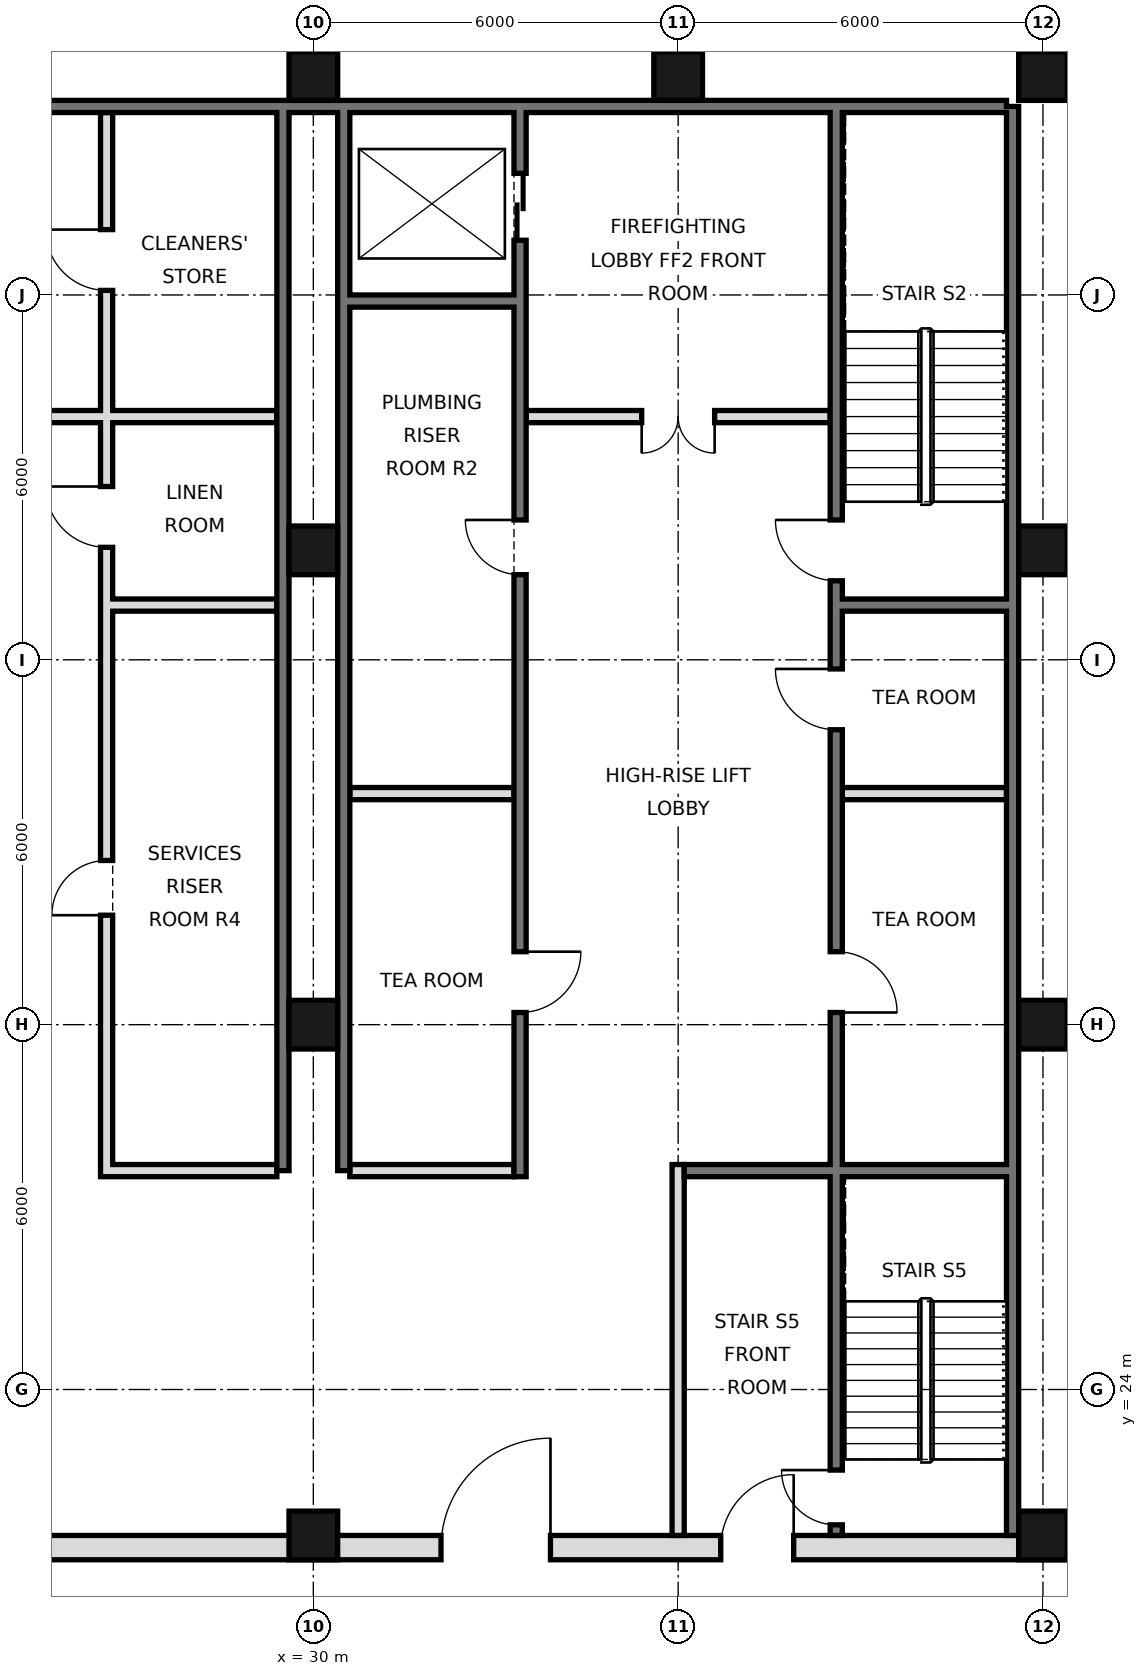
"""IFC4 building model, lengths in metres.
Left out: names, types, materials, properties, quantities, classifications, styles, units other than length and angle.
Written with IfcOpenShell. Run it as: python <this file> out.ifc"""

import sys

from ifc_helpers import new_model, si_unit, direction, frame, frame_2d, origin, origin_2d, place, context, subcontext, project, spatial, rectangle, hollow_rectangle, extrude, element, fill, save


model = new_model("IFC4")
c1 = context("Model", 3, precision=1e-05, world=origin(), true_north=direction((0.0, 1.0)))
c2 = subcontext(c1, "Body", "Model", "MODEL_VIEW")
j1 = project(units=[si_unit("LENGTHUNIT", "METRE"), si_unit("PLANEANGLEUNIT", "RADIAN")], contexts=[c1])
p1 = place(None, origin())
s1 = spatial("IfcSite", under=j1, at=p1, CompositionType="ELEMENT")
p2 = place(p1, origin())
s2 = spatial("IfcBuilding", under=s1, at=p2, CompositionType="ELEMENT")
p3 = place(p2, frame((0.0, 0.0, 82.2)))
s3 = spatial("IfcBuildingStorey", under=s2, at=p3, CompositionType="ELEMENT", Elevation=82.2)
for number, where, z_axis, x_axis in (
    (1, (30.0, 21.6, 0.0), (0.0, 0.0, 1.0), (1.0, 0.0, 0.0)),
    (2, (30.0, 30.0, 0.0), (0.0, 0.0, 1.0), (1.0, 0.0, 0.0)),
    (3, (30.0, 37.8, 0.0), (0.0, 0.0, 1.0), (1.0, 0.0, 0.0)),
    (4, (30.0, 45.6, 0.0), (0.0, 0.0, 1.0), (1.0, 0.0, 0.0)),
    (5, (36.0, 45.6, 0.0), (0.0, 0.0, 1.0), (1.0, 0.0, 0.0)),
    (6, (42.0, 21.6, 0.0), (0.0, 0.0, 1.0), (1.0, 0.0, 0.0)),
    (7, (42.0, 30.0, 0.0), (0.0, 0.0, 1.0), (1.0, 0.0, 0.0)),
    (8, (42.0, 37.8, 0.0), (0.0, 0.0, 1.0), (1.0, 0.0, 0.0)),
    (9, (42.0, 45.6, 0.0), (0.0, 0.0, 1.0), (1.0, 0.0, 0.0)),
):
    element("IfcColumn", number, at=place(p3, frame(where, z_axis=z_axis, x_axis=x_axis)), inside=s3, PredefinedType="COLUMN", context=c2, shape_type="SweptSolid", body=[
        extrude(hollow_rectangle(XDim=0.8, YDim=0.8, WallThickness=0.06, at=origin_2d()), origin(), (0.0, 0.0, 1.0), 3.6),
    ])
p4 = place(p3, frame((41.5, 21.6, 0.0), z_axis=(0.0, 0.0, 1.0), x_axis=(0.0, 1.0, 0.0)))
e10 = element("IfcWall", 10, at=p4, inside=s3, PredefinedType="SOLIDWALL", context=c2, shape_type="SweptSolid", body=[
    extrude(rectangle(XDim=23.5, YDim=0.2, at=frame_2d((11.75, 0.0))), origin(), (0.0, 0.0, 1.0), 3.42),
])
p5 = place(p3, frame((6.6, 45.1, 0.0), z_axis=(0.0, 0.0, 1.0), x_axis=(1.0, 0.0, 0.0)))
e11 = element("IfcWall", 11, at=p5, inside=s3, PredefinedType="SOLIDWALL", context=c2, shape_type="SweptSolid", body=[
    extrude(rectangle(XDim=34.8, YDim=0.2, at=frame_2d((17.4, 0.0))), origin(), (0.0, 0.0, 1.0), 3.42),
])
for number, where, z_axis, x_axis in (
    (12, (29.5, 27.6, 0.0), (0.0, 0.0, 1.0), (0.0, 1.0, 0.0)),
    (13, (30.5, 27.6, 0.0), (0.0, 0.0, 1.0), (0.0, 1.0, 0.0)),
):
    element("IfcWall", number, at=place(p3, frame(where, z_axis=z_axis, x_axis=x_axis)), inside=s3, PredefinedType="SOLIDWALL", context=c2, shape_type="SweptSolid", body=[
        extrude(rectangle(XDim=17.5, YDim=0.2, at=frame_2d((8.75, 0.0))), origin(), (0.0, 0.0, 1.0), 3.42),
    ])
p6 = place(p3, frame((5.6, 21.4, 0.0), z_axis=(0.0, 0.0, 1.0), x_axis=(1.0, 0.0, 0.0)))
e14 = element("IfcWall", 14, at=p6, inside=s3, PredefinedType="SOLIDWALL", context=c2, shape_type="SweptSolid", body=[
    extrude(rectangle(XDim=36.8, YDim=0.4, at=frame_2d((18.4, 0.0))), origin(), (0.0, 0.0, 1.0), 3.42),
])
p7 = place(p6, frame((8.5, 0.0, 0.0)))
e15 = element("IfcOpeningElement", 15, at=p7, cuts=e14, PredefinedType="OPENING", context=c2, shape_type="SweptSolid", body=[
    extrude(rectangle(XDim=1.8, YDim=2.1, at=frame_2d((0.9, 1.05))), frame((0.0, 0.21, 0.0), z_axis=(0.0, -1.0, 0.0), x_axis=(1.0, 0.0, 0.0)), (0.0, 0.0, 1.0), 0.42),
])
p8 = place(p6, frame((17.5, 0.0, 0.0)))
e16 = element("IfcOpeningElement", 16, at=p8, cuts=e14, PredefinedType="OPENING", context=c2, shape_type="SweptSolid", body=[
    extrude(rectangle(XDim=1.8, YDim=2.1, at=frame_2d((0.9, 1.05))), frame((0.0, 0.21, 0.0), z_axis=(0.0, -1.0, 0.0), x_axis=(1.0, 0.0, 0.0)), (0.0, 0.0, 1.0), 0.42),
])
p9 = place(p6, frame((26.5, 0.0, 0.0)))
e17 = element("IfcOpeningElement", 17, at=p9, cuts=e14, PredefinedType="OPENING", context=c2, shape_type="SweptSolid", body=[
    extrude(rectangle(XDim=1.8, YDim=2.1, at=frame_2d((0.9, 1.05))), frame((0.0, 0.21, 0.0), z_axis=(0.0, -1.0, 0.0), x_axis=(1.0, 0.0, 0.0)), (0.0, 0.0, 1.0), 0.42),
])
p10 = place(p6, frame((4.5, 0.0, 0.0)))
e18 = element("IfcOpeningElement", 18, at=p10, cuts=e14, PredefinedType="OPENING", context=c2, shape_type="SweptSolid", body=[
    extrude(rectangle(XDim=1.2, YDim=2.1, at=frame_2d((0.6, 1.05))), frame((0.0, 0.21, 0.0), z_axis=(0.0, -1.0, 0.0), x_axis=(1.0, 0.0, 0.0)), (0.0, 0.0, 1.0), 0.42),
])
p11 = place(p6, frame((31.1, 0.0, 0.0)))
e19 = element("IfcOpeningElement", 19, at=p11, cuts=e14, PredefinedType="OPENING", context=c2, shape_type="SweptSolid", body=[
    extrude(rectangle(XDim=1.2, YDim=2.1, at=frame_2d((0.6, 1.05))), frame((0.0, 0.21, 0.0), z_axis=(0.0, -1.0, 0.0), x_axis=(1.0, 0.0, 0.0)), (0.0, 0.0, 1.0), 0.42),
])
p12 = place(p3, frame((26.6, 27.5, 0.0), z_axis=(0.0, 0.0, 1.0), x_axis=(0.0, 1.0, 0.0)))
e20 = element("IfcWall", 20, at=p12, inside=s3, PredefinedType="SOLIDWALL", context=c2, shape_type="SweptSolid", body=[
    extrude(rectangle(XDim=17.5, YDim=0.2, at=frame_2d((8.75, 0.0))), origin(), (0.0, 0.0, 1.0), 3.42),
])
p13 = place(p12, frame((4.3, 0.0, 0.0)))
e21 = element("IfcOpeningElement", 21, at=p13, cuts=e20, PredefinedType="OPENING", context=c2, shape_type="SweptSolid", body=[
    extrude(rectangle(XDim=0.9, YDim=2.1, at=frame_2d((0.45, 1.05))), frame((0.0, 0.11, 0.0), z_axis=(0.0, -1.0, 0.0), x_axis=(1.0, 0.0, 0.0)), (0.0, 0.0, 1.0), 0.22),
])
p14 = place(p12, frame((10.35, 0.0, 0.0)))
e22 = element("IfcOpeningElement", 22, at=p14, cuts=e20, PredefinedType="OPENING", context=c2, shape_type="SweptSolid", body=[
    extrude(rectangle(XDim=1.0, YDim=2.1, at=frame_2d((0.5, 1.05))), frame((0.0, 0.11, 0.0), z_axis=(0.0, -1.0, 0.0), x_axis=(1.0, 0.0, 0.0)), (0.0, 0.0, 1.0), 0.22),
])
p15 = place(p12, frame((14.575, 0.0, 0.0)))
e23 = element("IfcOpeningElement", 23, at=p15, cuts=e20, PredefinedType="OPENING", context=c2, shape_type="SweptSolid", body=[
    extrude(rectangle(XDim=1.0, YDim=2.1, at=frame_2d((0.5, 1.05))), frame((0.0, 0.11, 0.0), z_axis=(0.0, -1.0, 0.0), x_axis=(1.0, 0.0, 0.0)), (0.0, 0.0, 1.0), 0.22),
])
p16 = place(p3, frame((33.4, 27.5, 0.0), z_axis=(0.0, 0.0, 1.0), x_axis=(0.0, 1.0, 0.0)))
e24 = element("IfcWall", 24, at=p16, inside=s3, PredefinedType="SOLIDWALL", context=c2, shape_type="SweptSolid", body=[
    extrude(rectangle(XDim=17.5, YDim=0.2, at=frame_2d((8.75, 0.0))), origin(), (0.0, 0.0, 1.0), 3.42),
])
p17 = place(p16, frame((15.4, 0.0, 0.0)))
e25 = element("IfcOpeningElement", 25, at=p17, cuts=e24, PredefinedType="OPENING", context=c2, shape_type="SweptSolid", body=[
    extrude(rectangle(XDim=1.1, YDim=2.1, at=frame_2d((0.55, 1.05))), frame((0.0, 0.11, 0.0), z_axis=(0.0, -1.0, 0.0), x_axis=(1.0, 0.0, 0.0)), (0.0, 0.0, 1.0), 0.22),
])
p18 = place(p16, frame((2.7, 0.0, 0.0)))
e26 = element("IfcOpeningElement", 26, at=p18, cuts=e24, PredefinedType="OPENING", context=c2, shape_type="SweptSolid", body=[
    extrude(rectangle(XDim=1.0, YDim=2.1, at=frame_2d((0.5, 1.05))), frame((0.0, 0.11, 0.0), z_axis=(0.0, -1.0, 0.0), x_axis=(1.0, 0.0, 0.0)), (0.0, 0.0, 1.0), 0.22),
])
p19 = place(p16, frame((9.9, 0.0, 0.0)))
e27 = element("IfcOpeningElement", 27, at=p19, cuts=e24, PredefinedType="OPENING", context=c2, shape_type="SweptSolid", body=[
    extrude(rectangle(XDim=0.9, YDim=2.1, at=frame_2d((0.45, 1.05))), frame((0.0, 0.11, 0.0), z_axis=(0.0, -1.0, 0.0), x_axis=(1.0, 0.0, 0.0)), (0.0, 0.0, 1.0), 0.22),
])
p20 = place(p3, frame((36.0, 21.6, 0.0), z_axis=(0.0, 0.0, 1.0), x_axis=(0.0, 1.0, 0.0)))
e28 = element("IfcWall", 28, at=p20, inside=s3, PredefinedType="PARTITIONING", context=c2, shape_type="SweptSolid", body=[
    extrude(rectangle(XDim=6.1, YDim=0.2, at=frame_2d((3.05, 0.0))), origin(), (0.0, 0.0, 1.0), 3.42),
])
p21 = place(p3, frame((38.6, 21.6, 0.0), z_axis=(0.0, 0.0, 1.0), x_axis=(0.0, 1.0, 0.0)))
e29 = element("IfcWall", 29, at=p21, inside=s3, PredefinedType="SOLIDWALL", context=c2, shape_type="SweptSolid", body=[
    extrude(rectangle(XDim=23.4, YDim=0.2, at=frame_2d((11.7, 0.0))), origin(), (0.0, 0.0, 1.0), 3.42),
])
p22 = place(p21, frame((8.6, 0.0, 0.0)))
e30 = element("IfcOpeningElement", 30, at=p22, cuts=e29, PredefinedType="OPENING", context=c2, shape_type="SweptSolid", body=[
    extrude(rectangle(XDim=1.0, YDim=2.1, at=frame_2d((0.5, 1.05))), frame((0.0, 0.11, 0.0), z_axis=(0.0, -1.0, 0.0), x_axis=(1.0, 0.0, 0.0)), (0.0, 0.0, 1.0), 0.22),
])
p23 = place(p21, frame((13.25, 0.0, 0.0)))
e31 = element("IfcOpeningElement", 31, at=p23, cuts=e29, PredefinedType="OPENING", context=c2, shape_type="SweptSolid", body=[
    extrude(rectangle(XDim=1.0, YDim=2.1, at=frame_2d((0.5, 1.05))), frame((0.0, 0.11, 0.0), z_axis=(0.0, -1.0, 0.0), x_axis=(1.0, 0.0, 0.0)), (0.0, 0.0, 1.0), 0.22),
])
p24 = place(p21, frame((15.7, 0.0, 0.0)))
e32 = element("IfcOpeningElement", 32, at=p24, cuts=e29, PredefinedType="OPENING", context=c2, shape_type="SweptSolid", body=[
    extrude(rectangle(XDim=1.0, YDim=2.1, at=frame_2d((0.5, 1.05))), frame((0.0, 0.11, 0.0), z_axis=(0.0, -1.0, 0.0), x_axis=(1.0, 0.0, 0.0)), (0.0, 0.0, 1.0), 0.22),
])
p25 = place(p21, frame((0.175, 0.0, 0.0)))
e33 = element("IfcOpeningElement", 33, at=p25, cuts=e29, PredefinedType="OPENING", context=c2, shape_type="SweptSolid", body=[
    extrude(rectangle(XDim=0.9, YDim=2.1, at=frame_2d((0.45, 1.05))), frame((0.0, 0.11, 0.0), z_axis=(0.0, -1.0, 0.0), x_axis=(1.0, 0.0, 0.0)), (0.0, 0.0, 1.0), 0.22),
])
p26 = place(p3, frame((26.7, 27.6, 0.0), z_axis=(0.0, 0.0, 1.0), x_axis=(1.0, 0.0, 0.0)))
e34 = element("IfcWall", 34, at=p26, inside=s3, PredefinedType="SOLIDWALL", context=c2, shape_type="SweptSolid", body=[
    extrude(rectangle(XDim=2.7, YDim=0.2, at=frame_2d((1.35, 0.0))), origin(), (0.0, 0.0, 1.0), 3.42),
])
p27 = place(p3, frame((30.6, 27.6, 0.0), z_axis=(0.0, 0.0, 1.0), x_axis=(1.0, 0.0, 0.0)))
e35 = element("IfcWall", 35, at=p27, inside=s3, PredefinedType="PARTITIONING", context=c2, shape_type="SweptSolid", body=[
    extrude(rectangle(XDim=2.7, YDim=0.2, at=frame_2d((1.35, 0.0))), origin(), (0.0, 0.0, 1.0), 3.42),
])
p28 = place(p3, frame((36.1, 27.6, 0.0), z_axis=(0.0, 0.0, 1.0), x_axis=(1.0, 0.0, 0.0)))
e36 = element("IfcWall", 36, at=p28, inside=s3, PredefinedType="SOLIDWALL", context=c2, shape_type="SweptSolid", body=[
    extrude(rectangle(XDim=5.3, YDim=0.2, at=frame_2d((2.65, 0.0))), origin(), (0.0, 0.0, 1.0), 3.42),
])
p29 = place(p3, frame((30.6, 33.8, 0.0), z_axis=(0.0, 0.0, 1.0), x_axis=(1.0, 0.0, 0.0)))
e37 = element("IfcWall", 37, at=p29, inside=s3, PredefinedType="SOLIDWALL", context=c2, shape_type="SweptSolid", body=[
    extrude(rectangle(XDim=2.7, YDim=0.2, at=frame_2d((1.35, 0.0))), origin(), (0.0, 0.0, 1.0), 3.42),
])
p30 = place(p3, frame((38.7, 33.8, 0.0), z_axis=(0.0, 0.0, 1.0), x_axis=(1.0, 0.0, 0.0)))
e38 = element("IfcWall", 38, at=p30, inside=s3, PredefinedType="PARTITIONING", context=c2, shape_type="SweptSolid", body=[
    extrude(rectangle(XDim=2.7, YDim=0.2, at=frame_2d((1.35, 0.0))), origin(), (0.0, 0.0, 1.0), 3.42),
])
for number, where, z_axis, x_axis in (
    (39, (26.7, 36.9, 0.0), (0.0, 0.0, 1.0), (1.0, 0.0, 0.0)),
    (40, (38.7, 36.9, 0.0), (0.0, 0.0, 1.0), (1.0, 0.0, 0.0)),
):
    element("IfcWall", number, at=place(p3, frame(where, z_axis=z_axis, x_axis=x_axis)), inside=s3, PredefinedType="SOLIDWALL", context=c2, shape_type="SweptSolid", body=[
        extrude(rectangle(XDim=2.7, YDim=0.2, at=frame_2d((1.35, 0.0))), origin(), (0.0, 0.0, 1.0), 3.42),
    ])
p31 = place(p3, frame((21.5, 40.0, 0.0), z_axis=(0.0, 0.0, 1.0), x_axis=(1.0, 0.0, 0.0)))
e41 = element("IfcWall", 41, at=p31, inside=s3, PredefinedType="PARTITIONING", context=c2, shape_type="SweptSolid", body=[
    extrude(rectangle(XDim=7.9, YDim=0.2, at=frame_2d((3.95, 0.0))), origin(), (0.0, 0.0, 1.0), 3.42),
])
p32 = place(p31, frame((1.9, 0.0, 0.0)))
e42 = element("IfcOpeningElement", 42, at=p32, cuts=e41, PredefinedType="OPENING", context=c2, shape_type="SweptSolid", body=[
    extrude(rectangle(XDim=1.2, YDim=2.1, at=frame_2d((0.6, 1.05))), frame((0.0, 0.11, 0.0), z_axis=(0.0, -1.0, 0.0), x_axis=(1.0, 0.0, 0.0)), (0.0, 0.0, 1.0), 0.22),
])
p33 = place(p3, frame((33.5, 40.0, 0.0), z_axis=(0.0, 0.0, 1.0), x_axis=(1.0, 0.0, 0.0)))
e43 = element("IfcWall", 43, at=p33, inside=s3, PredefinedType="PARTITIONING", context=c2, shape_type="SweptSolid", body=[
    extrude(rectangle(XDim=5.0, YDim=0.2, at=frame_2d((2.5, 0.0))), origin(), (0.0, 0.0, 1.0), 3.42),
])
p34 = place(p33, frame((1.9, 0.0, 0.0)))
e44 = element("IfcOpeningElement", 44, at=p34, cuts=e43, PredefinedType="OPENING", context=c2, shape_type="SweptSolid", body=[
    extrude(rectangle(XDim=1.2, YDim=2.1, at=frame_2d((0.6, 1.05))), frame((0.0, 0.11, 0.0), z_axis=(0.0, -1.0, 0.0), x_axis=(1.0, 0.0, 0.0)), (0.0, 0.0, 1.0), 0.22),
])
p35 = place(p3, frame((30.6, 41.9, 0.0), z_axis=(0.0, 0.0, 1.0), x_axis=(1.0, 0.0, 0.0)))
e45 = element("IfcWall", 45, at=p35, inside=s3, PredefinedType="SOLIDWALL", context=c2, shape_type="SweptSolid", body=[
    extrude(rectangle(XDim=2.7, YDim=0.2, at=frame_2d((1.35, 0.0))), origin(), (0.0, 0.0, 1.0), 3.42),
])
p36 = place(p9, frame((1.8, 0.0, 0.0), z_axis=(0.0, 0.0, 1.0), x_axis=(-1.0, 0.0, 0.0)))
e46 = element("IfcDoor", 46, at=p36, inside=s3, OperationType="SINGLE_SWING_LEFT", PredefinedType="DOOR", context=c2, shape_type="SweptSolid", body=[
    extrude(rectangle(XDim=1.8, YDim=2.1, at=frame_2d((0.9, 1.05))), frame((0.0, 0.025, 0.0), z_axis=(0.0, -1.0, 0.0), x_axis=(1.0, 0.0, 0.0)), (0.0, 0.0, 1.0), 0.05),
])
fill(e17, e46)
p37 = place(p11, frame((1.2, 0.0, 0.0), z_axis=(0.0, 0.0, 1.0), x_axis=(-1.0, 0.0, 0.0)))
e47 = element("IfcDoor", 47, at=p37, inside=s3, OperationType="SINGLE_SWING_LEFT", PredefinedType="DOOR", context=c2, shape_type="SweptSolid", body=[
    extrude(rectangle(XDim=1.2, YDim=2.1, at=frame_2d((0.6, 1.05))), frame((0.0, 0.025, 0.0), z_axis=(0.0, -1.0, 0.0), x_axis=(1.0, 0.0, 0.0)), (0.0, 0.0, 1.0), 0.05),
])
fill(e19, e47)
p38 = place(p34, frame((1.2, 0.0, 0.0), z_axis=(0.0, 0.0, 1.0), x_axis=(-1.0, 0.0, 0.0)))
e48 = element("IfcDoor", 48, at=p38, inside=s3, OperationType="DOUBLE_DOOR_SINGLE_SWING", PredefinedType="DOOR", context=c2, shape_type="SweptSolid", body=[
    extrude(rectangle(XDim=1.2, YDim=2.1, at=frame_2d((0.6, 1.05))), frame((0.0, 0.025, 0.0), z_axis=(0.0, -1.0, 0.0), x_axis=(1.0, 0.0, 0.0)), (0.0, 0.0, 1.0), 0.05),
])
fill(e44, e48)
p39 = place(p17, origin())
e49 = element("IfcDoor", 49, at=p39, inside=s3, OperationType="DOUBLE_DOOR_SLIDING", PredefinedType="DOOR", context=c2, shape_type="SweptSolid", body=[
    extrude(rectangle(XDim=1.1, YDim=2.1, at=frame_2d((0.55, 1.05))), frame((0.0, 0.025, 0.0), z_axis=(0.0, -1.0, 0.0), x_axis=(1.0, 0.0, 0.0)), (0.0, 0.0, 1.0), 0.05),
])
fill(e25, e49)
p40 = place(p22, frame((1.0, 0.0, 0.0), z_axis=(0.0, 0.0, 1.0), x_axis=(-1.0, 0.0, 0.0)))
e50 = element("IfcDoor", 50, at=p40, inside=s3, OperationType="SINGLE_SWING_RIGHT", PredefinedType="DOOR", context=c2, shape_type="SweptSolid", body=[
    extrude(rectangle(XDim=1.0, YDim=2.1, at=frame_2d((0.5, 1.05))), frame((0.0, 0.025, 0.0), z_axis=(0.0, -1.0, 0.0), x_axis=(1.0, 0.0, 0.0)), (0.0, 0.0, 1.0), 0.05),
])
fill(e30, e50)
p41 = place(p23, frame((1.0, 0.0, 0.0), z_axis=(0.0, 0.0, 1.0), x_axis=(-1.0, 0.0, 0.0)))
e51 = element("IfcDoor", 51, at=p41, inside=s3, OperationType="SINGLE_SWING_LEFT", PredefinedType="DOOR", context=c2, shape_type="SweptSolid", body=[
    extrude(rectangle(XDim=1.0, YDim=2.1, at=frame_2d((0.5, 1.05))), frame((0.0, 0.025, 0.0), z_axis=(0.0, -1.0, 0.0), x_axis=(1.0, 0.0, 0.0)), (0.0, 0.0, 1.0), 0.05),
])
fill(e31, e51)
p42 = place(p18, origin())
e52 = element("IfcDoor", 52, at=p42, inside=s3, OperationType="SINGLE_SWING_RIGHT", PredefinedType="DOOR", context=c2, shape_type="SweptSolid", body=[
    extrude(rectangle(XDim=1.0, YDim=2.1, at=frame_2d((0.5, 1.05))), frame((0.0, 0.025, 0.0), z_axis=(0.0, -1.0, 0.0), x_axis=(1.0, 0.0, 0.0)), (0.0, 0.0, 1.0), 0.05),
])
fill(e26, e52)
p43 = place(p24, frame((1.0, 0.0, 0.0), z_axis=(0.0, 0.0, 1.0), x_axis=(-1.0, 0.0, 0.0)))
e53 = element("IfcDoor", 53, at=p43, inside=s3, OperationType="SINGLE_SWING_LEFT", PredefinedType="DOOR", context=c2, shape_type="SweptSolid", body=[
    extrude(rectangle(XDim=1.0, YDim=2.1, at=frame_2d((0.5, 1.05))), frame((0.0, 0.025, 0.0), z_axis=(0.0, -1.0, 0.0), x_axis=(1.0, 0.0, 0.0)), (0.0, 0.0, 1.0), 0.05),
])
fill(e32, e53)
p44 = place(p25, frame((0.9, 0.0, 0.0), z_axis=(0.0, 0.0, 1.0), x_axis=(-1.0, 0.0, 0.0)))
e54 = element("IfcDoor", 54, at=p44, inside=s3, OperationType="SINGLE_SWING_LEFT", PredefinedType="DOOR", context=c2, shape_type="SweptSolid", body=[
    extrude(rectangle(XDim=0.9, YDim=2.1, at=frame_2d((0.45, 1.05))), frame((0.0, 0.025, 0.0), z_axis=(0.0, -1.0, 0.0), x_axis=(1.0, 0.0, 0.0)), (0.0, 0.0, 1.0), 0.05),
])
fill(e33, e54)
p45 = place(p19, frame((0.9, 0.0, 0.0), z_axis=(0.0, 0.0, 1.0), x_axis=(-1.0, 0.0, 0.0)))
e55 = element("IfcDoor", 55, at=p45, inside=s3, OperationType="SINGLE_SWING_LEFT", PredefinedType="DOOR", context=c2, shape_type="SweptSolid", body=[
    extrude(rectangle(XDim=0.9, YDim=2.1, at=frame_2d((0.45, 1.05))), frame((0.0, 0.025, 0.0), z_axis=(0.0, -1.0, 0.0), x_axis=(1.0, 0.0, 0.0)), (0.0, 0.0, 1.0), 0.05),
])
fill(e27, e55)
p46 = place(p13, origin())
e56 = element("IfcDoor", 56, at=p46, inside=s3, OperationType="SINGLE_SWING_LEFT", PredefinedType="DOOR", context=c2, shape_type="SweptSolid", body=[
    extrude(rectangle(XDim=0.9, YDim=2.1, at=frame_2d((0.45, 1.05))), frame((0.0, 0.025, 0.0), z_axis=(0.0, -1.0, 0.0), x_axis=(1.0, 0.0, 0.0)), (0.0, 0.0, 1.0), 0.05),
])
fill(e21, e56)
p47 = place(p14, frame((1.0, 0.0, 0.0), z_axis=(0.0, 0.0, 1.0), x_axis=(-1.0, 0.0, 0.0)))
e57 = element("IfcDoor", 57, at=p47, inside=s3, OperationType="SINGLE_SWING_LEFT", PredefinedType="DOOR", context=c2, shape_type="SweptSolid", body=[
    extrude(rectangle(XDim=1.0, YDim=2.1, at=frame_2d((0.5, 1.05))), frame((0.0, 0.025, 0.0), z_axis=(0.0, -1.0, 0.0), x_axis=(1.0, 0.0, 0.0)), (0.0, 0.0, 1.0), 0.05),
])
fill(e22, e57)
p48 = place(p15, frame((1.0, 0.0, 0.0), z_axis=(0.0, 0.0, 1.0), x_axis=(-1.0, 0.0, 0.0)))
e58 = element("IfcDoor", 58, at=p48, inside=s3, OperationType="SINGLE_SWING_LEFT", PredefinedType="DOOR", context=c2, shape_type="SweptSolid", body=[
    extrude(rectangle(XDim=1.0, YDim=2.1, at=frame_2d((0.5, 1.05))), frame((0.0, 0.025, 0.0), z_axis=(0.0, -1.0, 0.0), x_axis=(1.0, 0.0, 0.0)), (0.0, 0.0, 1.0), 0.05),
])
fill(e23, e58)
save(model, sys.argv[1])
